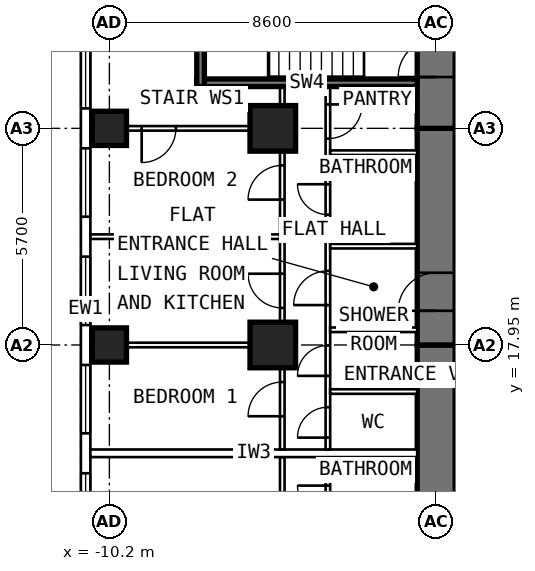
"""IFC4 building model, lengths in metres.
Left out: names, types, materials, properties, quantities, classifications, styles, units other than length and angle.
Written with IfcOpenShell. Run it as: python <this file> out.ifc"""

import sys

from ifc_helpers import new_model, si_unit, direction, frame, frame_2d, origin, origin_2d, place, context, subcontext, project, spatial, rectangle, extrude, element, fill, save


model = new_model("IFC4")
c1 = context("Model", 3, precision=1e-05, world=origin(), true_north=direction((0.0, 1.0)))
c2 = subcontext(c1, "Body", "Model", "MODEL_VIEW")
j1 = project(units=[si_unit("LENGTHUNIT", "METRE"), si_unit("PLANEANGLEUNIT", "RADIAN")], contexts=[c1])
p1 = place(None, origin())
s1 = spatial("IfcSite", under=j1, at=p1, CompositionType="ELEMENT")
p2 = place(p1, origin())
s2 = spatial("IfcBuilding", under=s1, at=p2, CompositionType="ELEMENT")
p3 = place(p2, frame((0.0, 0.0, 95.2)))
s3 = spatial("IfcBuildingStorey", under=s2, at=p3, CompositionType="ELEMENT", Elevation=95.2)
for number, where, z_axis, x_axis in (
    (1, (-10.2, 17.95, 0.0), (0.0, 0.0, 1.0), (0.0, 1.0, 0.0)),
    (2, (-10.2, 23.65, 0.0), (0.0, 0.0, 1.0), (0.0, 1.0, 0.0)),
):
    element("IfcColumn", number, at=place(p3, frame(where, z_axis=z_axis, x_axis=x_axis)), inside=s3, PredefinedType="COLUMN", context=c2, shape_type="SweptSolid", body=[
        extrude(rectangle(XDim=0.9, YDim=0.9, at=origin_2d()), origin(), (0.0, 0.0, 1.0), 3.6),
    ])
for number, where, z_axis, x_axis in (
    (3, (-5.9, 17.95, 0.0), (0.0, 0.0, 1.0), (0.0, 1.0, 0.0)),
    (4, (-5.9, 23.65, 0.0), (0.0, 0.0, 1.0), (0.0, 1.0, 0.0)),
):
    element("IfcColumn", number, at=place(p3, frame(where, z_axis=z_axis, x_axis=x_axis)), inside=s3, PredefinedType="COLUMN", context=c2, shape_type="SweptSolid", body=[
        extrude(rectangle(XDim=1.2, YDim=1.2, at=origin_2d()), origin(), (0.0, 0.0, 1.0), 3.6),
    ])
p4 = place(p3, frame((-1.6, 9.6, 0.0), z_axis=(0.0, 0.0, 1.0), x_axis=(0.0, 1.0, 0.0)))
e5 = element("IfcWall", 5, at=p4, inside=s3, PredefinedType="SHEAR", context=c2, shape_type="SweptSolid", body=[
    extrude(rectangle(XDim=8.35, YDim=1.0, at=frame_2d((4.175, 0.0))), origin(), (0.0, 0.0, 1.0), 3.6),
])
p5 = place(p4, frame((1.3, 0.0, 0.0)))
e6 = element("IfcOpeningElement", 6, at=p5, cuts=e5, PredefinedType="OPENING", context=c2, shape_type="SweptSolid", body=[
    extrude(rectangle(XDim=1.0, YDim=2.1, at=frame_2d((0.5, 1.05))), frame((0.0, 0.512, 0.0), z_axis=(0.0, -1.0, 0.0), x_axis=(1.0, 0.0, 0.0)), (0.0, 0.0, 1.0), 1.024),
])
p6 = place(p3, frame((-1.6, 17.95, 0.0), z_axis=(0.0, 0.0, 1.0), x_axis=(0.0, 1.0, 0.0)))
e7 = element("IfcWall", 7, at=p6, inside=s3, PredefinedType="SHEAR", context=c2, shape_type="SweptSolid", body=[
    extrude(rectangle(XDim=5.7, YDim=1.0, at=frame_2d((2.85, 0.0))), origin(), (0.0, 0.0, 1.0), 3.6),
])
p7 = place(p6, frame((0.9, 0.0, 0.0)))
e8 = element("IfcOpeningElement", 8, at=p7, cuts=e7, PredefinedType="OPENING", context=c2, shape_type="SweptSolid", body=[
    extrude(rectangle(XDim=1.0, YDim=2.1, at=frame_2d((0.5, 1.05))), frame((0.0, 0.512, 0.0), z_axis=(0.0, -1.0, 0.0), x_axis=(1.0, 0.0, 0.0)), (0.0, 0.0, 1.0), 1.024),
])
p8 = place(p3, frame((-1.6, 23.65, 0.0), z_axis=(0.0, 0.0, 1.0), x_axis=(0.0, 1.0, 0.0)))
e9 = element("IfcWall", 9, at=p8, inside=s3, PredefinedType="SHEAR", context=c2, shape_type="SweptSolid", body=[
    extrude(rectangle(XDim=10.745, YDim=1.0, at=frame_2d((5.373, 0.0))), origin(), (0.0, 0.0, 1.0), 3.6),
])
p9 = place(p8, frame((1.35, 0.0, 0.0)))
e10 = element("IfcOpeningElement", 10, at=p9, cuts=e9, PredefinedType="OPENING", context=c2, shape_type="SweptSolid", body=[
    extrude(rectangle(XDim=1.0, YDim=2.1, at=frame_2d((0.5, 1.05))), frame((0.0, 0.512, 0.0), z_axis=(0.0, -1.0, 0.0), x_axis=(1.0, 0.0, 0.0)), (0.0, 0.0, 1.0), 1.024),
])
p10 = place(p3, frame((-10.825, 6.148, 0.0), z_axis=(0.0, 0.0, 1.0), x_axis=(0.0, 1.0, 0.0)))
e11 = element("IfcWall", 11, at=p10, inside=s3, PredefinedType="SOLIDWALL", context=c2, shape_type="SweptSolid", body=[
    extrude(rectangle(XDim=25.487, YDim=0.25, at=frame_2d((12.744, 0.0))), origin(), (0.0, 0.0, 1.0), 3.35),
])
p11 = place(p10, frame((0.927, 0.0, 0.8)))
e12 = element("IfcOpeningElement", 12, at=p11, cuts=e11, PredefinedType="OPENING", context=c2, shape_type="SweptSolid", body=[
    extrude(rectangle(XDim=1.8, YDim=1.8, at=frame_2d((0.9, 0.9))), frame((0.0, 0.137, 0.0), z_axis=(0.0, -1.0, 0.0), x_axis=(1.0, 0.0, 0.0)), (0.0, 0.0, 1.0), 0.274),
])
p12 = place(p10, frame((3.777, 0.0, 0.8)))
e13 = element("IfcOpeningElement", 13, at=p12, cuts=e11, PredefinedType="OPENING", context=c2, shape_type="SweptSolid", body=[
    extrude(rectangle(XDim=1.8, YDim=1.8, at=frame_2d((0.9, 0.9))), frame((0.0, 0.137, 0.0), z_axis=(0.0, -1.0, 0.0), x_axis=(1.0, 0.0, 0.0)), (0.0, 0.0, 1.0), 0.274),
])
p13 = place(p10, frame((6.627, 0.0, 0.8)))
e14 = element("IfcOpeningElement", 14, at=p13, cuts=e11, PredefinedType="OPENING", context=c2, shape_type="SweptSolid", body=[
    extrude(rectangle(XDim=1.8, YDim=1.8, at=frame_2d((0.9, 0.9))), frame((0.0, 0.137, 0.0), z_axis=(0.0, -1.0, 0.0), x_axis=(1.0, 0.0, 0.0)), (0.0, 0.0, 1.0), 0.274),
])
p14 = place(p10, frame((9.477, 0.0, 0.8)))
e15 = element("IfcOpeningElement", 15, at=p14, cuts=e11, PredefinedType="OPENING", context=c2, shape_type="SweptSolid", body=[
    extrude(rectangle(XDim=1.8, YDim=1.8, at=frame_2d((0.9, 0.9))), frame((0.0, 0.137, 0.0), z_axis=(0.0, -1.0, 0.0), x_axis=(1.0, 0.0, 0.0)), (0.0, 0.0, 1.0), 0.274),
])
p15 = place(p10, frame((12.327, 0.0, 0.8)))
e16 = element("IfcOpeningElement", 16, at=p15, cuts=e11, PredefinedType="OPENING", context=c2, shape_type="SweptSolid", body=[
    extrude(rectangle(XDim=1.8, YDim=1.8, at=frame_2d((0.9, 0.9))), frame((0.0, 0.137, 0.0), z_axis=(0.0, -1.0, 0.0), x_axis=(1.0, 0.0, 0.0)), (0.0, 0.0, 1.0), 0.274),
])
p16 = place(p10, frame((15.177, 0.0, 0.8)))
e17 = element("IfcOpeningElement", 17, at=p16, cuts=e11, PredefinedType="OPENING", context=c2, shape_type="SweptSolid", body=[
    extrude(rectangle(XDim=1.8, YDim=1.8, at=frame_2d((0.9, 0.9))), frame((0.0, 0.137, 0.0), z_axis=(0.0, -1.0, 0.0), x_axis=(1.0, 0.0, 0.0)), (0.0, 0.0, 1.0), 0.274),
])
p17 = place(p10, frame((18.027, 0.0, 0.8)))
e18 = element("IfcOpeningElement", 18, at=p17, cuts=e11, PredefinedType="OPENING", context=c2, shape_type="SweptSolid", body=[
    extrude(rectangle(XDim=1.8, YDim=1.8, at=frame_2d((0.9, 0.9))), frame((0.0, 0.137, 0.0), z_axis=(0.0, -1.0, 0.0), x_axis=(1.0, 0.0, 0.0)), (0.0, 0.0, 1.0), 0.274),
])
p18 = place(p10, frame((20.877, 0.0, 0.8)))
e19 = element("IfcOpeningElement", 19, at=p18, cuts=e11, PredefinedType="OPENING", context=c2, shape_type="SweptSolid", body=[
    extrude(rectangle(XDim=1.8, YDim=1.8, at=frame_2d((0.9, 0.9))), frame((0.0, 0.137, 0.0), z_axis=(0.0, -1.0, 0.0), x_axis=(1.0, 0.0, 0.0)), (0.0, 0.0, 1.0), 0.274),
])
p19 = place(p3, frame((-4.45, 10.1, 0.0), z_axis=(0.0, 0.0, 1.0), x_axis=(0.0, 1.0, 0.0)))
e20 = element("IfcWall", 20, at=p19, inside=s3, PredefinedType="PARTITIONING", context=c2, shape_type="SweptSolid", body=[
    extrude(rectangle(XDim=4.9, YDim=0.12, at=frame_2d((2.45, 0.0))), origin(), (0.0, 0.0, 1.0), 3.35),
])
p20 = place(p19, frame((0.75, 0.0, 0.0)))
e21 = element("IfcOpeningElement", 21, at=p20, cuts=e20, PredefinedType="OPENING", context=c2, shape_type="SweptSolid", body=[
    extrude(rectangle(XDim=0.9, YDim=2.1, at=frame_2d((0.45, 1.05))), frame((0.0, 0.072, 0.0), z_axis=(0.0, -1.0, 0.0), x_axis=(1.0, 0.0, 0.0)), (0.0, 0.0, 1.0), 0.144),
])
p21 = place(p19, frame((3.35, 0.0, 0.0)))
e22 = element("IfcOpeningElement", 22, at=p21, cuts=e20, PredefinedType="OPENING", context=c2, shape_type="SweptSolid", body=[
    extrude(rectangle(XDim=0.8, YDim=2.1, at=frame_2d((0.4, 1.05))), frame((0.0, 0.072, 0.0), z_axis=(0.0, -1.0, 0.0), x_axis=(1.0, 0.0, 0.0)), (0.0, 0.0, 1.0), 0.144),
])
p22 = place(p3, frame((-5.65, 9.6, 0.0), z_axis=(0.0, 0.0, 1.0), x_axis=(0.0, 1.0, 0.0)))
e23 = element("IfcWall", 23, at=p22, inside=s3, PredefinedType="PARTITIONING", context=c2, shape_type="SweptSolid", body=[
    extrude(rectangle(XDim=5.4, YDim=0.12, at=frame_2d((2.7, 0.0))), origin(), (0.0, 0.0, 1.0), 3.35),
])
p23 = place(p22, frame((3.4, 0.0, 0.0)))
e24 = element("IfcOpeningElement", 24, at=p23, cuts=e23, PredefinedType="OPENING", context=c2, shape_type="SweptSolid", body=[
    extrude(rectangle(XDim=0.9, YDim=2.1, at=frame_2d((0.45, 1.05))), frame((0.0, 0.072, 0.0), z_axis=(0.0, -1.0, 0.0), x_axis=(1.0, 0.0, 0.0)), (0.0, 0.0, 1.0), 0.144),
])
p24 = place(p3, frame((-4.45, 15.2, 0.0), z_axis=(0.0, 0.0, 1.0), x_axis=(0.0, 1.0, 0.0)))
e25 = element("IfcWall", 25, at=p24, inside=s3, PredefinedType="PARTITIONING", context=c2, shape_type="SweptSolid", body=[
    extrude(rectangle(XDim=9.55, YDim=0.12, at=frame_2d((4.775, 0.0))), origin(), (0.0, 0.0, 1.0), 3.35),
])
p25 = place(p24, frame((0.312, 0.0, 0.0)))
e26 = element("IfcOpeningElement", 26, at=p25, cuts=e25, PredefinedType="OPENING", context=c2, shape_type="SweptSolid", body=[
    extrude(rectangle(XDim=0.8, YDim=2.1, at=frame_2d((0.4, 1.05))), frame((0.0, 0.072, 0.0), z_axis=(0.0, -1.0, 0.0), x_axis=(1.0, 0.0, 0.0)), (0.0, 0.0, 1.0), 0.144),
])
p26 = place(p24, frame((1.938, 0.0, 0.0)))
e27 = element("IfcOpeningElement", 27, at=p26, cuts=e25, PredefinedType="OPENING", context=c2, shape_type="SweptSolid", body=[
    extrude(rectangle(XDim=0.8, YDim=2.1, at=frame_2d((0.4, 1.05))), frame((0.0, 0.072, 0.0), z_axis=(0.0, -1.0, 0.0), x_axis=(1.0, 0.0, 0.0)), (0.0, 0.0, 1.0), 0.144),
])
p27 = place(p24, frame((3.8, 0.0, 0.0)))
e28 = element("IfcOpeningElement", 28, at=p27, cuts=e25, PredefinedType="OPENING", context=c2, shape_type="SweptSolid", body=[
    extrude(rectangle(XDim=0.9, YDim=2.1, at=frame_2d((0.45, 1.05))), frame((0.0, 0.072, 0.0), z_axis=(0.0, -1.0, 0.0), x_axis=(1.0, 0.0, 0.0)), (0.0, 0.0, 1.0), 0.144),
])
p28 = place(p24, frame((6.18, 0.0, 0.0)))
e29 = element("IfcOpeningElement", 29, at=p28, cuts=e25, PredefinedType="OPENING", context=c2, shape_type="SweptSolid", body=[
    extrude(rectangle(XDim=0.8, YDim=2.1, at=frame_2d((0.4, 1.05))), frame((0.0, 0.072, 0.0), z_axis=(0.0, -1.0, 0.0), x_axis=(1.0, 0.0, 0.0)), (0.0, 0.0, 1.0), 0.144),
])
p29 = place(p24, frame((8.18, 0.0, 0.0)))
e30 = element("IfcOpeningElement", 30, at=p29, cuts=e25, PredefinedType="OPENING", context=c2, shape_type="SweptSolid", body=[
    extrude(rectangle(XDim=0.9, YDim=2.1, at=frame_2d((0.45, 1.05))), frame((0.0, 0.072, 0.0), z_axis=(0.0, -1.0, 0.0), x_axis=(1.0, 0.0, 0.0)), (0.0, 0.0, 1.0), 0.144),
])
p30 = place(p3, frame((-5.65, 15.2, 0.0), z_axis=(0.0, 0.0, 1.0), x_axis=(0.0, 1.0, 0.0)))
e31 = element("IfcWall", 31, at=p30, inside=s3, PredefinedType="PARTITIONING", context=c2, shape_type="SweptSolid", body=[
    extrude(rectangle(XDim=9.55, YDim=0.12, at=frame_2d((4.775, 0.0))), origin(), (0.0, 0.0, 1.0), 3.35),
])
p31 = place(p30, frame((0.875, 0.0, 0.0)))
e32 = element("IfcOpeningElement", 32, at=p31, cuts=e31, PredefinedType="OPENING", context=c2, shape_type="SweptSolid", body=[
    extrude(rectangle(XDim=0.9, YDim=2.1, at=frame_2d((0.45, 1.05))), frame((0.0, 0.072, 0.0), z_axis=(0.0, -1.0, 0.0), x_axis=(1.0, 0.0, 0.0)), (0.0, 0.0, 1.0), 0.144),
])
p32 = place(p30, frame((3.725, 0.0, 0.0)))
e33 = element("IfcOpeningElement", 33, at=p32, cuts=e31, PredefinedType="OPENING", context=c2, shape_type="SweptSolid", body=[
    extrude(rectangle(XDim=0.9, YDim=2.1, at=frame_2d((0.45, 1.05))), frame((0.0, 0.072, 0.0), z_axis=(0.0, -1.0, 0.0), x_axis=(1.0, 0.0, 0.0)), (0.0, 0.0, 1.0), 0.144),
])
p33 = place(p30, frame((6.575, 0.0, 0.0)))
e34 = element("IfcOpeningElement", 34, at=p33, cuts=e31, PredefinedType="OPENING", context=c2, shape_type="SweptSolid", body=[
    extrude(rectangle(XDim=0.9, YDim=2.1, at=frame_2d((0.45, 1.05))), frame((0.0, 0.072, 0.0), z_axis=(0.0, -1.0, 0.0), x_axis=(1.0, 0.0, 0.0)), (0.0, 0.0, 1.0), 0.144),
])
p34 = place(p3, frame((-5.71, 17.95, 0.0), z_axis=(0.0, 0.0, 1.0), x_axis=(-1.0, 0.0, 0.0)))
e35 = element("IfcWall", 35, at=p34, inside=s3, PredefinedType="PARTITIONING", context=c2, shape_type="SweptSolid", body=[
    extrude(rectangle(XDim=4.99, YDim=0.12, at=frame_2d((2.495, 0.0))), origin(), (0.0, 0.0, 1.0), 2.45),
])
p35 = place(p3, frame((-5.71, 20.8, 0.0), z_axis=(0.0, 0.0, 1.0), x_axis=(-1.0, 0.0, 0.0)))
e36 = element("IfcWall", 36, at=p35, inside=s3, PredefinedType="PARTITIONING", context=c2, shape_type="SweptSolid", body=[
    extrude(rectangle(XDim=4.99, YDim=0.12, at=frame_2d((2.495, 0.0))), origin(), (0.0, 0.0, 1.0), 3.35),
])
for number, where, z_axis, x_axis in (
    (37, (-2.1, 16.725, 0.0), (0.0, 0.0, 1.0), (-1.0, 0.0, 0.0)),
    (38, (-2.1, 18.35, 0.0), (0.0, 0.0, 1.0), (-1.0, 0.0, 0.0)),
    (39, (-2.1, 20.55, 0.0), (0.0, 0.0, 1.0), (-1.0, 0.0, 0.0)),
    (40, (-2.1, 23.01, 0.0), (0.0, 0.0, 1.0), (-1.0, 0.0, 0.0)),
):
    element("IfcWall", number, at=place(p3, frame(where, z_axis=z_axis, x_axis=x_axis)), inside=s3, PredefinedType="PARTITIONING", context=c2, shape_type="SweptSolid", body=[
        extrude(rectangle(XDim=2.29, YDim=0.12, at=frame_2d((1.145, 0.0))), origin(), (0.0, 0.0, 1.0), 3.35),
    ])
p36 = place(p3, frame((-2.1, 15.1, 0.0), z_axis=(0.0, 0.0, 1.0), x_axis=(-1.0, 0.0, 0.0)))
e41 = element("IfcWall", 41, at=p36, inside=s3, PredefinedType="PARTITIONING", context=c2, shape_type="SweptSolid", body=[
    extrude(rectangle(XDim=8.6, YDim=0.2, at=frame_2d((4.3, 0.0))), origin(), (0.0, 0.0, 1.0), 3.35),
])
p37 = place(p3, frame((-5.71, 23.65, 0.0), z_axis=(0.0, 0.0, 1.0), x_axis=(-1.0, 0.0, 0.0)))
e42 = element("IfcWall", 42, at=p37, inside=s3, PredefinedType="PARTITIONING", context=c2, shape_type="SweptSolid", body=[
    extrude(rectangle(XDim=4.99, YDim=0.12, at=frame_2d((2.495, 0.0))), origin(), (0.0, 0.0, 1.0), 2.45),
])
p38 = place(p37, frame((2.74, 0.0, 0.0)))
e43 = element("IfcOpeningElement", 43, at=p38, cuts=e42, PredefinedType="OPENING", context=c2, shape_type="SweptSolid", body=[
    extrude(rectangle(XDim=0.9, YDim=2.1, at=frame_2d((0.45, 1.05))), frame((0.0, 0.072, 0.0), z_axis=(0.0, -1.0, 0.0), x_axis=(1.0, 0.0, 0.0)), (0.0, 0.0, 1.0), 0.144),
])
p39 = place(p3, frame((-2.1, 24.85, 0.0), z_axis=(0.0, 0.0, 1.0), x_axis=(-1.0, 0.0, 0.0)))
e44 = element("IfcWall", 44, at=p39, inside=s3, PredefinedType="SHEAR", context=c2, shape_type="SweptSolid", body=[
    extrude(rectangle(XDim=5.8, YDim=0.2, at=frame_2d((2.9, 0.0))), origin(), (0.0, 0.0, 1.0), 3.33),
])
p40 = place(p3, frame((-7.8, 24.75, 0.0), z_axis=(0.0, 0.0, 1.0), x_axis=(0.0, 1.0, 0.0)))
e45 = element("IfcWall", 45, at=p40, inside=s3, PredefinedType="SHEAR", context=c2, shape_type="SweptSolid", body=[
    extrude(rectangle(XDim=4.0, YDim=0.2, at=frame_2d((2.0, 0.0))), origin(), (0.0, 0.0, 1.0), 3.33),
])
p41 = place(p13, origin())
e46 = element("IfcWindow", 46, at=p41, inside=s3, PartitioningType="SINGLE_PANEL", PredefinedType="WINDOW", context=c2, shape_type="SweptSolid", body=[
    extrude(rectangle(XDim=1.8, YDim=1.8, at=frame_2d((0.9, 0.9))), frame((0.0, 0.03, 0.0), z_axis=(0.0, -1.0, 0.0), x_axis=(1.0, 0.0, 0.0)), (0.0, 0.0, 1.0), 0.06),
])
fill(e14, e46)
p42 = place(p14, origin())
e47 = element("IfcWindow", 47, at=p42, inside=s3, PartitioningType="SINGLE_PANEL", PredefinedType="WINDOW", context=c2, shape_type="SweptSolid", body=[
    extrude(rectangle(XDim=1.8, YDim=1.8, at=frame_2d((0.9, 0.9))), frame((0.0, 0.03, 0.0), z_axis=(0.0, -1.0, 0.0), x_axis=(1.0, 0.0, 0.0)), (0.0, 0.0, 1.0), 0.06),
])
fill(e15, e47)
p43 = place(p15, origin())
e48 = element("IfcWindow", 48, at=p43, inside=s3, PartitioningType="SINGLE_PANEL", PredefinedType="WINDOW", context=c2, shape_type="SweptSolid", body=[
    extrude(rectangle(XDim=1.8, YDim=1.8, at=frame_2d((0.9, 0.9))), frame((0.0, 0.03, 0.0), z_axis=(0.0, -1.0, 0.0), x_axis=(1.0, 0.0, 0.0)), (0.0, 0.0, 1.0), 0.06),
])
fill(e16, e48)
p44 = place(p16, origin())
e49 = element("IfcWindow", 49, at=p44, inside=s3, PartitioningType="SINGLE_PANEL", PredefinedType="WINDOW", context=c2, shape_type="SweptSolid", body=[
    extrude(rectangle(XDim=1.8, YDim=1.8, at=frame_2d((0.9, 0.9))), frame((0.0, 0.03, 0.0), z_axis=(0.0, -1.0, 0.0), x_axis=(1.0, 0.0, 0.0)), (0.0, 0.0, 1.0), 0.06),
])
fill(e17, e49)
p45 = place(p17, origin())
e50 = element("IfcWindow", 50, at=p45, inside=s3, PartitioningType="SINGLE_PANEL", PredefinedType="WINDOW", context=c2, shape_type="SweptSolid", body=[
    extrude(rectangle(XDim=1.8, YDim=1.8, at=frame_2d((0.9, 0.9))), frame((0.0, 0.03, 0.0), z_axis=(0.0, -1.0, 0.0), x_axis=(1.0, 0.0, 0.0)), (0.0, 0.0, 1.0), 0.06),
])
fill(e18, e50)
p46 = place(p21, origin())
e51 = element("IfcDoor", 51, at=p46, inside=s3, OperationType="SINGLE_SWING_RIGHT", PredefinedType="DOOR", context=c2, shape_type="SweptSolid", body=[
    extrude(rectangle(XDim=0.8, YDim=2.1, at=frame_2d((0.4, 1.05))), frame((0.0, 0.025, 0.0), z_axis=(0.0, -1.0, 0.0), x_axis=(1.0, 0.0, 0.0)), (0.0, 0.0, 1.0), 0.05),
])
fill(e22, e51)
p47 = place(p7, origin())
e52 = element("IfcDoor", 52, at=p47, inside=s3, OperationType="SINGLE_SWING_LEFT", PredefinedType="DOOR", context=c2, shape_type="SweptSolid", body=[
    extrude(rectangle(XDim=1.0, YDim=2.1, at=frame_2d((0.5, 1.05))), frame((0.0, 0.25, 0.0), z_axis=(0.0, -1.0, 0.0), x_axis=(1.0, 0.0, 0.0)), (0.0, 0.0, 1.0), 0.5),
])
fill(e8, e52)
p48 = place(p31, origin())
e53 = element("IfcDoor", 53, at=p48, inside=s3, OperationType="SINGLE_SWING_LEFT", PredefinedType="DOOR", context=c2, shape_type="SweptSolid", body=[
    extrude(rectangle(XDim=0.9, YDim=2.1, at=frame_2d((0.45, 1.05))), frame((0.0, 0.025, 0.0), z_axis=(0.0, -1.0, 0.0), x_axis=(1.0, 0.0, 0.0)), (0.0, 0.0, 1.0), 0.05),
])
fill(e32, e53)
p49 = place(p32, origin())
e54 = element("IfcDoor", 54, at=p49, inside=s3, OperationType="SINGLE_SWING_RIGHT", PredefinedType="DOOR", context=c2, shape_type="SweptSolid", body=[
    extrude(rectangle(XDim=0.9, YDim=2.1, at=frame_2d((0.45, 1.05))), frame((0.0, 0.025, 0.0), z_axis=(0.0, -1.0, 0.0), x_axis=(1.0, 0.0, 0.0)), (0.0, 0.0, 1.0), 0.05),
])
fill(e33, e54)
p50 = place(p33, origin())
e55 = element("IfcDoor", 55, at=p50, inside=s3, OperationType="SINGLE_SWING_LEFT", PredefinedType="DOOR", context=c2, shape_type="SweptSolid", body=[
    extrude(rectangle(XDim=0.9, YDim=2.1, at=frame_2d((0.45, 1.05))), frame((0.0, 0.025, 0.0), z_axis=(0.0, -1.0, 0.0), x_axis=(1.0, 0.0, 0.0)), (0.0, 0.0, 1.0), 0.05),
])
fill(e34, e55)
p51 = place(p25, origin())
e56 = element("IfcDoor", 56, at=p51, inside=s3, OperationType="SINGLE_SWING_LEFT", PredefinedType="DOOR", context=c2, shape_type="SweptSolid", body=[
    extrude(rectangle(XDim=0.8, YDim=2.1, at=frame_2d((0.4, 1.05))), frame((0.0, 0.025, 0.0), z_axis=(0.0, -1.0, 0.0), x_axis=(1.0, 0.0, 0.0)), (0.0, 0.0, 1.0), 0.05),
])
fill(e26, e56)
p52 = place(p26, origin())
e57 = element("IfcDoor", 57, at=p52, inside=s3, OperationType="SINGLE_SWING_LEFT", PredefinedType="DOOR", context=c2, shape_type="SweptSolid", body=[
    extrude(rectangle(XDim=0.8, YDim=2.1, at=frame_2d((0.4, 1.05))), frame((0.0, 0.025, 0.0), z_axis=(0.0, -1.0, 0.0), x_axis=(1.0, 0.0, 0.0)), (0.0, 0.0, 1.0), 0.05),
])
fill(e27, e57)
p53 = place(p27, origin())
e58 = element("IfcDoor", 58, at=p53, inside=s3, OperationType="SINGLE_SWING_LEFT", PredefinedType="DOOR", context=c2, shape_type="SweptSolid", body=[
    extrude(rectangle(XDim=0.9, YDim=2.1, at=frame_2d((0.45, 1.05))), frame((0.0, 0.025, 0.0), z_axis=(0.0, -1.0, 0.0), x_axis=(1.0, 0.0, 0.0)), (0.0, 0.0, 1.0), 0.05),
])
fill(e28, e58)
p54 = place(p28, origin())
e59 = element("IfcDoor", 59, at=p54, inside=s3, OperationType="SINGLE_SWING_RIGHT", PredefinedType="DOOR", context=c2, shape_type="SweptSolid", body=[
    extrude(rectangle(XDim=0.8, YDim=2.1, at=frame_2d((0.4, 1.05))), frame((0.0, 0.025, 0.0), z_axis=(0.0, -1.0, 0.0), x_axis=(1.0, 0.0, 0.0)), (0.0, 0.0, 1.0), 0.05),
])
fill(e29, e59)
p55 = place(p29, frame((0.9, 0.0, 0.0), z_axis=(0.0, 0.0, 1.0), x_axis=(-1.0, 0.0, 0.0)))
e60 = element("IfcDoor", 60, at=p55, inside=s3, OperationType="SINGLE_SWING_LEFT", PredefinedType="DOOR", context=c2, shape_type="SweptSolid", body=[
    extrude(rectangle(XDim=0.9, YDim=2.1, at=frame_2d((0.45, 1.05))), frame((0.0, 0.025, 0.0), z_axis=(0.0, -1.0, 0.0), x_axis=(1.0, 0.0, 0.0)), (0.0, 0.0, 1.0), 0.05),
])
fill(e30, e60)
p56 = place(p38, origin())
e61 = element("IfcDoor", 61, at=p56, inside=s3, OperationType="SINGLE_SWING_RIGHT", PredefinedType="DOOR", context=c2, shape_type="SweptSolid", body=[
    extrude(rectangle(XDim=0.9, YDim=2.1, at=frame_2d((0.45, 1.05))), frame((0.0, 0.025, 0.0), z_axis=(0.0, -1.0, 0.0), x_axis=(1.0, 0.0, 0.0)), (0.0, 0.0, 1.0), 0.05),
])
fill(e43, e61)
p57 = place(p9, origin())
e62 = element("IfcDoor", 62, at=p57, inside=s3, OperationType="SINGLE_SWING_LEFT", PredefinedType="DOOR", context=c2, shape_type="SweptSolid", body=[
    extrude(rectangle(XDim=1.0, YDim=2.1, at=frame_2d((0.5, 1.05))), frame((0.0, 0.25, 0.0), z_axis=(0.0, -1.0, 0.0), x_axis=(1.0, 0.0, 0.0)), (0.0, 0.0, 1.0), 0.5),
])
fill(e10, e62)
save(model, sys.argv[1])
